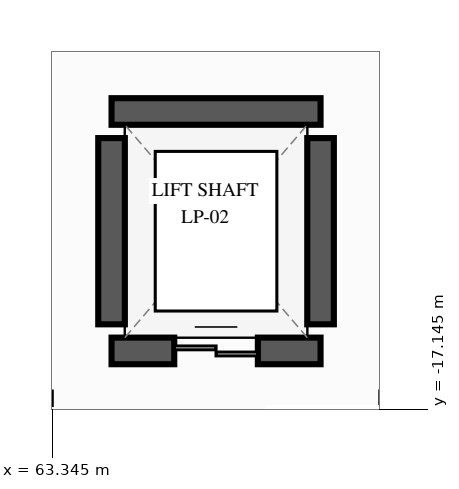
"""IFC4 building model, lengths in metres.
Left out: names, types, materials, properties, quantities, classifications, styles, units other than length and angle.
Written with IfcOpenShell. Run it as: python <this file> out.ifc"""

import sys

from ifc_helpers import new_model, si_unit, direction, frame, frame_2d, origin, place, context, subcontext, project, spatial, rectangle, extrude, element, fill, save


model = new_model("IFC4")
c1 = context("Model", 3, precision=1e-05, world=origin(), true_north=direction((0.0, 1.0)))
c2 = subcontext(c1, "Body", "Model", "MODEL_VIEW")
j1 = project(units=[si_unit("LENGTHUNIT", "METRE"), si_unit("PLANEANGLEUNIT", "RADIAN")], contexts=[c1])
p1 = place(None, origin())
s1 = spatial("IfcSite", under=j1, at=p1, CompositionType="ELEMENT")
p2 = place(p1, origin())
s2 = spatial("IfcBuilding", under=s1, at=p2, CompositionType="ELEMENT")
p3 = place(p2, frame((0.0, 0.0, 10.8)))
s3 = spatial("IfcBuildingStorey", under=s2, at=p3, CompositionType="ELEMENT", Elevation=10.8)
p4 = place(p3, frame((64.125, -16.375, 0.0), z_axis=(0.0, 0.0, 1.0), x_axis=(1.0, 0.0, 0.0)))
e1 = element("IfcWall", 1, at=p4, inside=s3, PredefinedType="SHEAR", context=c2, shape_type="SweptSolid", body=[
    extrude(rectangle(XDim=2.75, YDim=0.35, at=frame_2d((1.375, 0.0))), origin(), (0.0, 0.0, 1.0), 5.16),
])
p5 = place(p4, frame((0.825, 0.0, 0.0)))
e2 = element("IfcOpeningElement", 2, at=p5, cuts=e1, PredefinedType="OPENING", context=c2, shape_type="SweptSolid", body=[
    extrude(rectangle(XDim=1.1, YDim=2.2, at=frame_2d((0.55, 1.1))), frame((0.0, 0.185, 0.0), z_axis=(0.0, -1.0, 0.0), x_axis=(1.0, 0.0, 0.0)), (0.0, 0.0, 1.0), 0.37),
])
p6 = place(p3, frame((66.875, -13.225, 0.0), z_axis=(0.0, 0.0, 1.0), x_axis=(-1.0, 0.0, 0.0)))
e3 = element("IfcWall", 3, at=p6, inside=s3, PredefinedType="SHEAR", context=c2, shape_type="SweptSolid", body=[
    extrude(rectangle(XDim=2.75, YDim=0.35, at=frame_2d((1.375, 0.0))), origin(), (0.0, 0.0, 1.0), 5.16),
])
for number, where, z_axis, x_axis in (
    (4, (64.125, -16.025, 0.0), (0.0, 0.0, 1.0), (0.0, 1.0, 0.0)),
    (5, (66.875, -16.025, 0.0), (0.0, 0.0, 1.0), (0.0, 1.0, 0.0)),
):
    element("IfcWall", number, at=place(p3, frame(where, z_axis=z_axis, x_axis=x_axis)), inside=s3, PredefinedType="SHEAR", context=c2, shape_type="SweptSolid", body=[
        extrude(rectangle(XDim=2.45, YDim=0.35, at=frame_2d((1.225, 0.0))), origin(), (0.0, 0.0, 1.0), 5.16),
    ])
p7 = place(p5, origin())
e6 = element("IfcDoor", 6, at=p7, inside=s3, OperationType="DOUBLE_DOOR_SLIDING", PredefinedType="DOOR", context=c2, shape_type="SweptSolid", body=[
    extrude(rectangle(XDim=1.1, YDim=2.2, at=frame_2d((0.55, 1.1))), frame((0.0, 0.025, 0.0), z_axis=(0.0, -1.0, 0.0), x_axis=(1.0, 0.0, 0.0)), (0.0, 0.0, 1.0), 0.05),
])
fill(e2, e6)
save(model, sys.argv[1])
